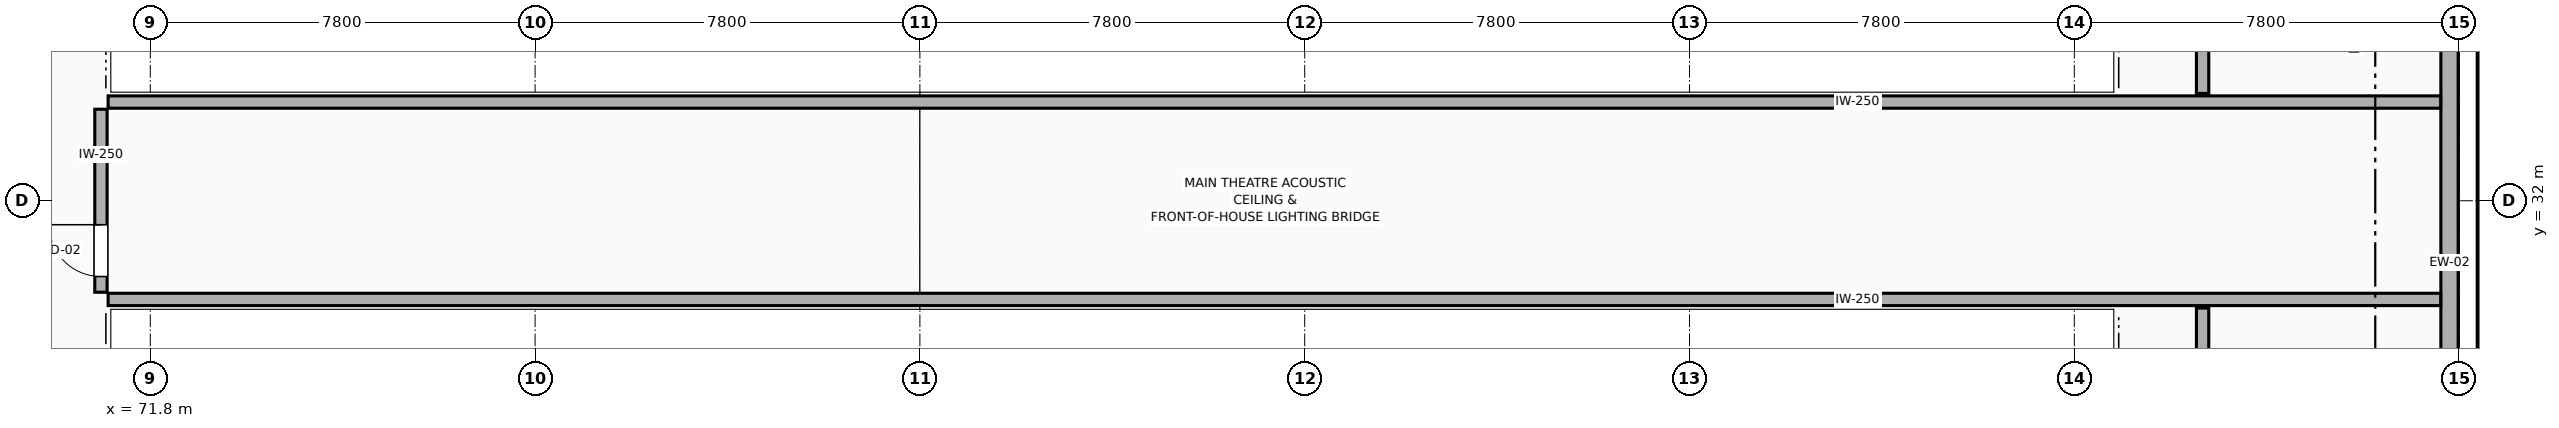
"""IFC4 building model, lengths in metres.
Left out: names, types, materials, properties, quantities, classifications, styles, units other than length and angle.
Written with IfcOpenShell. Run it as: python <this file> out.ifc"""

import sys

from ifc_helpers import new_model, si_unit, direction, frame, frame_2d, origin, place, context, subcontext, project, spatial, rectangle, extrude, element, fill, save


model = new_model("IFC4")
c1 = context("Model", 3, precision=1e-05, world=origin(), true_north=direction((0.0, 1.0)))
c2 = subcontext(c1, "Body", "Model", "MODEL_VIEW")
j1 = project(units=[si_unit("LENGTHUNIT", "METRE"), si_unit("PLANEANGLEUNIT", "RADIAN")], contexts=[c1])
p1 = place(None, origin())
s1 = spatial("IfcSite", under=j1, at=p1, CompositionType="ELEMENT")
p2 = place(p1, origin())
s2 = spatial("IfcBuilding", under=s1, at=p2, CompositionType="ELEMENT")
p3 = place(p2, frame((0.0, 0.0, 19.8)))
s3 = spatial("IfcBuildingStorey", under=s2, at=p3, CompositionType="ELEMENT", Elevation=19.8)
p4 = place(p3, frame((118.405, 41.815, 0.0), z_axis=(0.0, 0.0, 1.0), x_axis=(0.0, -1.0, 0.0)))
e1 = element("IfcWall", 1, at=p4, inside=s3, PredefinedType="STANDARD", context=c2, shape_type="SweptSolid", body=[
    extrude(rectangle(XDim=31.63, YDim=0.35, at=frame_2d((15.815, 0.0))), origin(), (0.0, 0.0, 1.0), 1.25),
])
p5 = place(p3, frame((119.08, 24.15, 0.0), z_axis=(0.0, 0.0, 1.0), x_axis=(0.0, 1.0, 0.0)))
e2 = element("IfcWall", 2, at=p5, inside=s3, PredefinedType="PARAPET", context=c2, shape_type="SweptSolid", body=[
    extrude(rectangle(XDim=17.4, YDim=0.22, at=frame_2d((8.7, 0.0))), origin(), (0.0, 0.0, 1.0), 1.15),
])
for number, where, z_axis, x_axis in (
    (3, (70.945, 34.0, 0.0), (0.0, 0.0, 1.0), (1.0, 0.0, 0.0)),
    (4, (118.226, 30.0, 0.0), (0.0, 0.0, 1.0), (-1.0, 0.0, 0.0)),
):
    element("IfcWall", number, at=place(p3, frame(where, z_axis=z_axis, x_axis=x_axis)), inside=s3, PredefinedType="PARTITIONING", context=c2, shape_type="SweptSolid", body=[
        extrude(rectangle(XDim=47.281, YDim=0.25, at=frame_2d((23.641, 0.0))), origin(), (0.0, 0.0, 1.0), 4.5),
    ])
p6 = place(p3, frame((70.8, 30.145, 0.0), z_axis=(0.0, 0.0, 1.0), x_axis=(0.0, 1.0, 0.0)))
e5 = element("IfcWall", 5, at=p6, inside=s3, PredefinedType="PARTITIONING", context=c2, shape_type="SweptSolid", body=[
    extrude(rectangle(XDim=3.71, YDim=0.25, at=frame_2d((1.855, 0.0))), origin(), (0.0, 0.0, 1.0), 4.5),
])
p7 = place(p6, frame((0.319, 0.0, 0.0)))
e6 = element("IfcOpeningElement", 6, at=p7, cuts=e5, PredefinedType="OPENING", context=c2, shape_type="SweptSolid", body=[
    extrude(rectangle(XDim=1.05, YDim=2.15, at=frame_2d((0.525, 1.075))), frame((0.0, 0.135, 0.0), z_axis=(0.0, -1.0, 0.0), x_axis=(1.0, 0.0, 0.0)), (0.0, 0.0, 1.0), 0.27),
])
p8 = place(p3, frame((113.4, 24.145, 0.0), z_axis=(0.0, 0.0, 1.0), x_axis=(0.0, 1.0, 0.0)))
e7 = element("IfcWall", 7, at=p8, inside=s3, PredefinedType="PARTITIONING", context=c2, shape_type="SweptSolid", body=[
    extrude(rectangle(XDim=5.68, YDim=0.25, at=frame_2d((2.84, 0.0))), origin(), (0.0, 0.0, 1.0), 4.5),
])
p9 = place(p3, frame((113.4, 34.175, 0.0), z_axis=(0.0, 0.0, 1.0), x_axis=(0.0, 1.0, 0.0)))
e8 = element("IfcWall", 8, at=p9, inside=s3, PredefinedType="PARTITIONING", context=c2, shape_type="SweptSolid", body=[
    extrude(rectangle(XDim=2.03, YDim=0.25, at=frame_2d((1.015, 0.0))), origin(), (0.0, 0.0, 1.0), 4.5),
])
p10 = place(p7, origin())
e9 = element("IfcDoor", 9, at=p10, inside=s3, OperationType="SINGLE_SWING_RIGHT", PredefinedType="DOOR", context=c2, shape_type="SweptSolid", body=[
    extrude(rectangle(XDim=1.05, YDim=2.15, at=frame_2d((0.525, 1.075))), frame((0.0, 0.025, 0.0), z_axis=(0.0, -1.0, 0.0), x_axis=(1.0, 0.0, 0.0)), (0.0, 0.0, 1.0), 0.05),
])
fill(e6, e9)
save(model, sys.argv[1])
